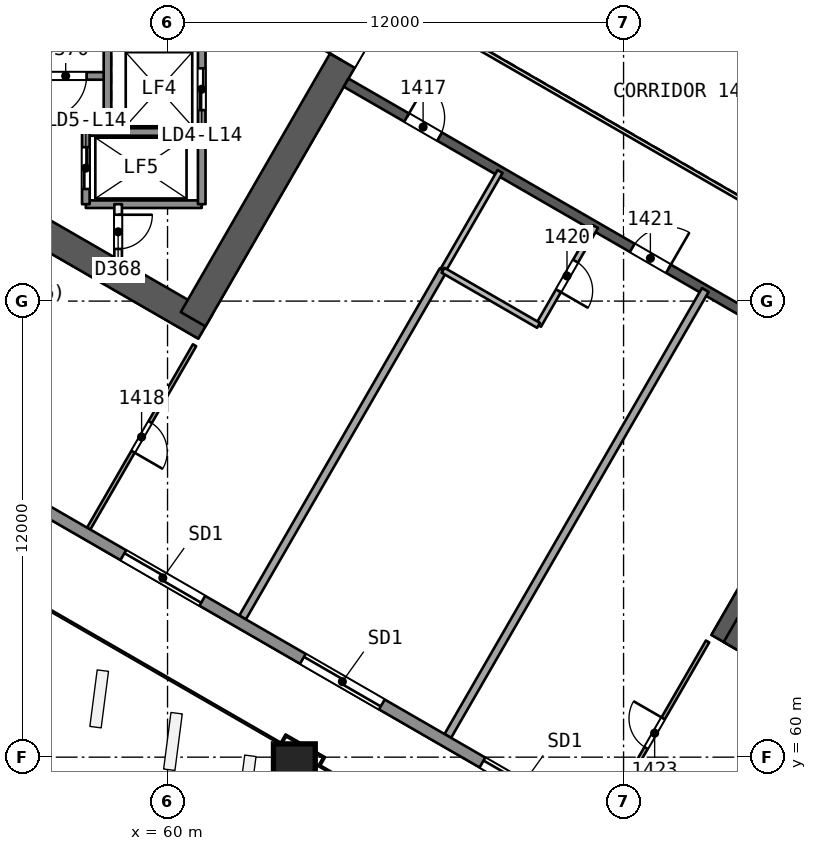
"""IFC4 building model, lengths in metres.
Left out: names, types, materials, properties, quantities, classifications, styles, units other than length and angle.
Written with IfcOpenShell. Run it as: python <this file> out.ifc"""

import sys

from ifc_helpers import new_model, si_unit, direction, frame, frame_2d, origin, origin_2d, place, context, subcontext, project, spatial, rectangle, extrude, element, fill, save


model = new_model("IFC4")
c1 = context("Model", 3, precision=1e-05, world=origin(), true_north=direction((0.0, 1.0)))
c2 = subcontext(c1, "Body", "Model", "MODEL_VIEW")
j1 = project(units=[si_unit("LENGTHUNIT", "METRE"), si_unit("PLANEANGLEUNIT", "RADIAN")], contexts=[c1])
p1 = place(None, origin())
s1 = spatial("IfcSite", under=j1, at=p1, CompositionType="ELEMENT")
p2 = place(p1, origin())
s2 = spatial("IfcBuilding", under=s1, at=p2, CompositionType="ELEMENT")
p3 = place(p2, frame((0.0, 0.0, 64.7)))
s3 = spatial("IfcBuildingStorey", under=s2, at=p3, CompositionType="ELEMENT", Elevation=64.7)
p4 = place(p3, frame((48.772, 78.394, 0.0), z_axis=(0.0, 0.0, 1.0), x_axis=(0.866028339916, -0.499994914436, 0.0)))
e1 = element("IfcWall", 1, at=p4, inside=s3, PredefinedType="SHEAR", context=c2, shape_type="SweptSolid", body=[
    extrude(rectangle(XDim=14.117, YDim=0.75, at=frame_2d((7.059, 0.0))), origin(), (0.0, 0.0, 1.0), 3.7),
])
p5 = place(p3, frame((60.673, 71.523, 0.0), z_axis=(0.0, 0.0, 1.0), x_axis=(0.499997052475, 0.866027105532, 0.0)))
e2 = element("IfcWall", 2, at=p5, inside=s3, PredefinedType="SHEAR", context=c2, shape_type="SweptSolid", body=[
    extrude(rectangle(XDim=10.005, YDim=0.75, at=frame_2d((5.002, 0.0))), origin(), (0.0, 0.0, 1.0), 3.7),
])
p6 = place(p5, frame((7.855, 0.0, 0.0)))
e3 = element("IfcOpeningElement", 3, at=p6, cuts=e2, PredefinedType="OPENING", context=c2, shape_type="SweptSolid", body=[
    extrude(rectangle(XDim=1.2, YDim=2.1, at=frame_2d((0.6, 1.05))), frame((0.0, 0.385, 0.0), z_axis=(0.0, -1.0, 0.0), x_axis=(1.0, 0.0, 0.0)), (0.0, 0.0, 1.0), 0.771),
])
p7 = place(p3, frame((79.717, 71.831, 0.0), z_axis=(0.0, 0.0, 1.0), x_axis=(-0.499996230114, -0.866027580318, 0.0)))
e4 = element("IfcWall", 4, at=p7, inside=s3, PredefinedType="SHEAR", context=c2, shape_type="SweptSolid", body=[
    extrude(rectangle(XDim=10.164, YDim=0.75, at=frame_2d((5.082, 0.0))), origin(), (0.0, 0.0, 1.0), 3.7),
])
p8 = place(p7, frame((0.733, 0.0, 0.0)))
e5 = element("IfcOpeningElement", 5, at=p8, cuts=e4, PredefinedType="OPENING", context=c2, shape_type="SweptSolid", body=[
    extrude(rectangle(XDim=1.2, YDim=2.1, at=frame_2d((0.6, 1.05))), frame((0.0, 0.385, 0.0), z_axis=(0.0, -1.0, 0.0), x_axis=(1.0, 0.0, 0.0)), (0.0, 0.0, 1.0), 0.771),
])
p9 = place(p3, frame((74.822, 63.354, 0.0), z_axis=(0.0, 0.0, 1.0), x_axis=(0.8660248072, -0.500001033313, 0.0)))
e6 = element("IfcWall", 6, at=p9, inside=s3, PredefinedType="SHEAR", context=c2, shape_type="SweptSolid", body=[
    extrude(rectangle(XDim=13.958, YDim=0.75, at=frame_2d((6.979, 0.0))), origin(), (0.0, 0.0, 1.0), 3.7),
])
p10 = place(p3, frame((64.7, 77.748, 0.0), z_axis=(0.0, 0.0, 1.0), x_axis=(0.866026492143, -0.499998114903, 0.0)))
e7 = element("IfcWall", 7, at=p10, inside=s3, PredefinedType="SHEAR", context=c2, shape_type="SweptSolid", body=[
    extrude(rectangle(XDim=15.588, YDim=0.25, at=frame_2d((7.794, 0.0))), origin(), (0.0, 0.0, 1.0), 3.2),
])
p11 = place(p10, frame((1.838, 0.0, 0.0)))
e8 = element("IfcOpeningElement", 8, at=p11, cuts=e7, PredefinedType="OPENING", context=c2, shape_type="SweptSolid", body=[
    extrude(rectangle(XDim=1.0, YDim=2.1, at=frame_2d((0.5, 1.05))), frame((0.0, 0.135, 0.0), z_axis=(0.0, -1.0, 0.0), x_axis=(1.0, 0.0, 0.0)), (0.0, 0.0, 1.0), 0.271),
])
p12 = place(p10, frame((8.694, 0.0, 0.0)))
e9 = element("IfcOpeningElement", 9, at=p12, cuts=e7, PredefinedType="OPENING", context=c2, shape_type="SweptSolid", body=[
    extrude(rectangle(XDim=1.1, YDim=2.1, at=frame_2d((0.55, 1.05))), frame((0.0, 0.135, 0.0), z_axis=(0.0, -1.0, 0.0), x_axis=(1.0, 0.0, 0.0)), (0.0, 0.0, 1.0), 0.271),
])
p13 = place(p10, frame((12.75, 0.0, 0.0)))
e10 = element("IfcOpeningElement", 10, at=p13, cuts=e7, PredefinedType="OPENING", context=c2, shape_type="SweptSolid", body=[
    extrude(rectangle(XDim=1.0, YDim=2.1, at=frame_2d((0.5, 1.05))), frame((0.0, 0.135, 0.0), z_axis=(0.0, -1.0, 0.0), x_axis=(1.0, 0.0, 0.0)), (0.0, 0.0, 1.0), 0.271),
])
p14 = place(p3, frame((63.325, 59.779, 0.0), z_axis=(0.010093620709, 0.017482414954, 0.999796221231), x_axis=(-0.866022643586, 0.500004780773, 1.3036e-08)))
e11 = element("IfcColumn", 11, at=p14, inside=s3, PredefinedType="COLUMN", context=c2, shape_type="SweptSolid", body=[
    extrude(rectangle(XDim=1.1, YDim=1.1, at=origin_2d()), origin(), (0.0, 0.0, 1.0), 3.701),
])
p15 = place(p3, frame((60.71, 70.838, 0.0), z_axis=(0.0, 0.0, 1.0), x_axis=(-0.499994302092, -0.866028693448, 0.0)))
e12 = element("IfcWall", 12, at=p15, inside=s3, PredefinedType="PARTITIONING", context=c2, shape_type="SweptSolid", body=[
    extrude(rectangle(XDim=5.571, YDim=0.1, at=frame_2d((2.786, 0.0))), origin(), (0.0, 0.0, 1.0), 3.2),
])
p16 = place(p15, frame((2.336, 0.0, 0.0)))
e13 = element("IfcOpeningElement", 13, at=p16, cuts=e12, PredefinedType="OPENING", context=c2, shape_type="SweptSolid", body=[
    extrude(rectangle(XDim=0.9, YDim=2.1, at=frame_2d((0.45, 1.05))), frame((0.0, 0.061, 0.0), z_axis=(0.0, -1.0, 0.0), x_axis=(1.0, 0.0, 0.0)), (0.0, 0.0, 1.0), 0.121),
])
p17 = place(p3, frame((61.975, 63.675, 0.0), z_axis=(0.0, 0.0, 1.0), x_axis=(0.499994206371, 0.866028748712, 0.0)))
e14 = element("IfcWall", 14, at=p17, inside=s3, PredefinedType="PARTITIONING", context=c2, shape_type="SweptSolid", body=[
    extrude(rectangle(XDim=10.551, YDim=0.2, at=frame_2d((5.275, 0.0))), origin(), (0.0, 0.0, 1.0), 3.2),
])
p18 = place(p3, frame((67.25, 72.812, 0.0), z_axis=(0.0, 0.0, 1.0), x_axis=(0.499990139034, 0.866031096941, 0.0)))
e15 = element("IfcWall", 15, at=p18, inside=s3, PredefinedType="PARTITIONING", context=c2, shape_type="SweptSolid", body=[
    extrude(rectangle(XDim=3.0, YDim=0.15, at=frame_2d((1.5, 0.0))), origin(), (0.0, 0.0, 1.0), 3.2),
])
p19 = place(p3, frame((71.261, 73.96, 0.0), z_axis=(0.0, 0.0, 1.0), x_axis=(-0.50002537861, -0.866010750942, 0.0)))
e16 = element("IfcWall", 16, at=p19, inside=s3, PredefinedType="PARTITIONING", context=c2, shape_type="SweptSolid", body=[
    extrude(rectangle(XDim=3.0, YDim=0.15, at=frame_2d((1.5, 0.0))), origin(), (0.0, 0.0, 1.0), 3.2),
])
p20 = place(p19, frame((1.05, 0.0, 0.0)))
e17 = element("IfcOpeningElement", 17, at=p20, cuts=e16, PredefinedType="OPENING", context=c2, shape_type="SweptSolid", body=[
    extrude(rectangle(XDim=0.9, YDim=2.1, at=frame_2d((0.45, 1.05))), frame((0.0, 0.085, 0.0), z_axis=(0.0, -1.0, 0.0), x_axis=(1.0, 0.0, 0.0)), (0.0, 0.0, 1.0), 0.171),
])
p21 = place(p3, frame((69.761, 71.362, 0.0), z_axis=(0.0, 0.0, 1.0), x_axis=(-0.866032775405, 0.499987231761, 0.0)))
e18 = element("IfcWall", 18, at=p21, inside=s3, PredefinedType="PARTITIONING", context=c2, shape_type="SweptSolid", body=[
    extrude(rectangle(XDim=2.9, YDim=0.15, at=frame_2d((1.45, 0.0))), origin(), (0.0, 0.0, 1.0), 3.2),
])
p22 = place(p3, frame((67.375, 60.557, 0.0), z_axis=(0.0, 0.0, 1.0), x_axis=(0.499993305868, 0.866029268609, 0.0)))
e19 = element("IfcWall", 19, at=p22, inside=s3, PredefinedType="PARTITIONING", context=c2, shape_type="SweptSolid", body=[
    extrude(rectangle(XDim=13.551, YDim=0.2, at=frame_2d((6.775, 0.0))), origin(), (0.0, 0.0, 1.0), 3.2),
])
p23 = place(p3, frame((71.425, 58.219, 0.0), z_axis=(0.0, 0.0, 1.0), x_axis=(0.499975327912, 0.866039647752, 0.0)))
e20 = element("IfcWall", 20, at=p23, inside=s3, PredefinedType="PARTITIONING", context=c2, shape_type="SweptSolid", body=[
    extrude(rectangle(XDim=5.572, YDim=0.1, at=frame_2d((2.786, 0.0))), origin(), (0.0, 0.0, 1.0), 3.2),
])
p24 = place(p23, frame((2.336, 0.0, 0.0)))
e21 = element("IfcOpeningElement", 21, at=p24, cuts=e20, PredefinedType="OPENING", context=c2, shape_type="SweptSolid", body=[
    extrude(rectangle(XDim=0.9, YDim=2.1, at=frame_2d((0.45, 1.05))), frame((0.0, 0.061, 0.0), z_axis=(0.0, -1.0, 0.0), x_axis=(1.0, 0.0, 0.0)), (0.0, 0.0, 1.0), 0.121),
])
p25 = place(p3, frame((90.499, 47.034, 0.0), z_axis=(0.0, 0.0, 1.0), x_axis=(-0.866026049211, 0.499998882086, 0.0)))
e22 = element("IfcWall", 22, at=p25, inside=s3, PredefinedType="SOLIDWALL", context=c2, shape_type="SweptSolid", body=[
    extrude(rectangle(XDim=59.811, YDim=0.3, at=frame_2d((29.905, 0.0))), origin(), (0.0, 0.0, 1.0), 3.2),
])
p26 = place(p25, frame((28.705, 0.0, 0.0)))
e23 = element("IfcOpeningElement", 23, at=p26, cuts=e22, PredefinedType="OPENING", context=c2, shape_type="SweptSolid", body=[
    extrude(rectangle(XDim=2.4, YDim=2.4, at=frame_2d((1.2, 1.2))), frame((0.0, 0.161, 0.0), z_axis=(0.0, -1.0, 0.0), x_axis=(1.0, 0.0, 0.0)), (0.0, 0.0, 1.0), 0.321),
])
p27 = place(p25, frame((34.161, 0.0, 0.0)))
e24 = element("IfcOpeningElement", 24, at=p27, cuts=e22, PredefinedType="OPENING", context=c2, shape_type="SweptSolid", body=[
    extrude(rectangle(XDim=2.4, YDim=2.4, at=frame_2d((1.2, 1.2))), frame((0.0, 0.161, 0.0), z_axis=(0.0, -1.0, 0.0), x_axis=(1.0, 0.0, 0.0)), (0.0, 0.0, 1.0), 0.321),
])
p28 = place(p25, frame((46.394, 0.0, 0.0)))
e25 = element("IfcOpeningElement", 25, at=p28, cuts=e22, PredefinedType="OPENING", context=c2, shape_type="SweptSolid", body=[
    extrude(rectangle(XDim=2.4, YDim=2.4, at=frame_2d((1.2, 1.2))), frame((0.0, 0.161, 0.0), z_axis=(0.0, -1.0, 0.0), x_axis=(1.0, 0.0, 0.0)), (0.0, 0.0, 1.0), 0.321),
])
p29 = place(p25, frame((23.249, 0.0, 0.0)))
e26 = element("IfcOpeningElement", 26, at=p29, cuts=e22, PredefinedType="OPENING", context=c2, shape_type="SweptSolid", body=[
    extrude(rectangle(XDim=2.4, YDim=2.4, at=frame_2d((1.2, 1.2))), frame((0.0, 0.161, 0.0), z_axis=(0.0, -1.0, 0.0), x_axis=(1.0, 0.0, 0.0)), (0.0, 0.0, 1.0), 0.321),
])
p30 = place(p25, frame((11.002, 0.0, 0.0)))
e27 = element("IfcOpeningElement", 27, at=p30, cuts=e22, PredefinedType="OPENING", context=c2, shape_type="SweptSolid", body=[
    extrude(rectangle(XDim=2.4, YDim=2.4, at=frame_2d((1.2, 1.2))), frame((0.0, 0.161, 0.0), z_axis=(0.0, -1.0, 0.0), x_axis=(1.0, 0.0, 0.0)), (0.0, 0.0, 1.0), 0.321),
])
p31 = place(p3, frame((58.42, 77.925, 0.0), z_axis=(0.0, 0.0, 1.0), x_axis=(-1.0, 0.0, 0.0)))
e28 = element("IfcWall", 28, at=p31, inside=s3, PredefinedType="SOLIDWALL", context=c2, shape_type="SweptSolid", body=[
    extrude(rectangle(XDim=7.7, YDim=0.2, at=frame_2d((3.85, 0.0))), origin(), (0.0, 0.0, 1.0), 3.2),
])
p32 = place(p31, frame((0.55, 0.0, 0.0)))
e29 = element("IfcOpeningElement", 29, at=p32, cuts=e28, PredefinedType="OPENING", context=c2, shape_type="SweptSolid", body=[
    extrude(rectangle(XDim=1.1, YDim=2.1, at=frame_2d((0.55, 1.05))), frame((0.0, 0.11, 0.0), z_axis=(0.0, -1.0, 0.0), x_axis=(1.0, 0.0, 0.0)), (0.0, 0.0, 1.0), 0.221),
])
for number, where, z_axis, x_axis in (
    (30, (60.9, 76.45, 0.0), (0.0, 0.0, 1.0), (-1.0, 0.0, 0.0)),
    (31, (60.9, 74.55, 0.0), (0.0, 0.0, 1.0), (-1.0, 0.0, 0.0)),
):
    element("IfcWall", number, at=place(p3, frame(where, z_axis=z_axis, x_axis=x_axis)), inside=s3, PredefinedType="SOLIDWALL", context=c2, shape_type="SweptSolid", body=[
        extrude(rectangle(XDim=3.05, YDim=0.2, at=frame_2d((1.525, 0.0))), origin(), (0.0, 0.0, 1.0), 3.2),
    ])
p33 = place(p3, frame((60.9, 85.45, 0.0), z_axis=(0.0, 0.0, 1.0), x_axis=(0.0, -1.0, 0.0)))
e32 = element("IfcWall", 32, at=p33, inside=s3, PredefinedType="SOLIDWALL", context=c2, shape_type="SweptSolid", body=[
    extrude(rectangle(XDim=10.9, YDim=0.2, at=frame_2d((5.45, 0.0))), origin(), (0.0, 0.0, 1.0), 3.2),
])
p34 = place(p33, frame((0.575, 0.0, 0.0)))
e33 = element("IfcOpeningElement", 33, at=p34, cuts=e32, PredefinedType="OPENING", context=c2, shape_type="SweptSolid", body=[
    extrude(rectangle(XDim=1.1, YDim=2.1, at=frame_2d((0.55, 1.05))), frame((0.0, 0.11, 0.0), z_axis=(0.0, -1.0, 0.0), x_axis=(1.0, 0.0, 0.0)), (0.0, 0.0, 1.0), 0.221),
])
p35 = place(p33, frame((2.825, 0.0, 0.0)))
e34 = element("IfcOpeningElement", 34, at=p35, cuts=e32, PredefinedType="OPENING", context=c2, shape_type="SweptSolid", body=[
    extrude(rectangle(XDim=1.1, YDim=2.1, at=frame_2d((0.55, 1.05))), frame((0.0, 0.11, 0.0), z_axis=(0.0, -1.0, 0.0), x_axis=(1.0, 0.0, 0.0)), (0.0, 0.0, 1.0), 0.221),
])
p36 = place(p33, frame((5.075, 0.0, 0.0)))
e35 = element("IfcOpeningElement", 35, at=p36, cuts=e32, PredefinedType="OPENING", context=c2, shape_type="SweptSolid", body=[
    extrude(rectangle(XDim=1.1, YDim=2.1, at=frame_2d((0.55, 1.05))), frame((0.0, 0.11, 0.0), z_axis=(0.0, -1.0, 0.0), x_axis=(1.0, 0.0, 0.0)), (0.0, 0.0, 1.0), 0.221),
])
p37 = place(p33, frame((7.325, 0.0, 0.0)))
e36 = element("IfcOpeningElement", 36, at=p37, cuts=e32, PredefinedType="OPENING", context=c2, shape_type="SweptSolid", body=[
    extrude(rectangle(XDim=1.1, YDim=2.1, at=frame_2d((0.55, 1.05))), frame((0.0, 0.11, 0.0), z_axis=(0.0, -1.0, 0.0), x_axis=(1.0, 0.0, 0.0)), (0.0, 0.0, 1.0), 0.221),
])
p38 = place(p3, frame((58.7, 74.55, 0.0), z_axis=(0.0, 0.0, 1.0), x_axis=(0.0, -1.0, 0.0)))
e37 = element("IfcWall", 37, at=p38, inside=s3, PredefinedType="PARTITIONING", context=c2, shape_type="SweptSolid", body=[
    extrude(rectangle(XDim=1.455, YDim=0.2, at=frame_2d((0.728, 0.0))), origin(), (0.0, 0.0, 1.0), 3.2),
])
p39 = place(p38, frame((0.278, 0.0, 0.0)))
e38 = element("IfcOpeningElement", 38, at=p39, cuts=e37, PredefinedType="OPENING", context=c2, shape_type="SweptSolid", body=[
    extrude(rectangle(XDim=0.9, YDim=2.1, at=frame_2d((0.45, 1.05))), frame((0.0, 0.11, 0.0), z_axis=(0.0, -1.0, 0.0), x_axis=(1.0, 0.0, 0.0)), (0.0, 0.0, 1.0), 0.221),
])
p40 = place(p3, frame((58.42, 85.45, 0.0), z_axis=(0.0, 0.0, 1.0), x_axis=(0.0, -1.0, 0.0)))
e39 = element("IfcWall", 39, at=p40, inside=s3, PredefinedType="SOLIDWALL", context=c2, shape_type="SweptSolid", body=[
    extrude(rectangle(XDim=9.0, YDim=0.2, at=frame_2d((4.5, 0.0))), origin(), (0.0, 0.0, 1.0), 3.2),
])
p41 = place(p3, frame((57.85, 76.45, 0.0), z_axis=(0.0, 0.0, 1.0), x_axis=(0.0, -1.0, 0.0)))
e40 = element("IfcWall", 40, at=p41, inside=s3, PredefinedType="SOLIDWALL", context=c2, shape_type="SweptSolid", body=[
    extrude(rectangle(XDim=1.9, YDim=0.2, at=frame_2d((0.95, 0.0))), origin(), (0.0, 0.0, 1.0), 3.2),
])
p42 = place(p41, frame((0.4, 0.0, 0.0)))
e41 = element("IfcOpeningElement", 41, at=p42, cuts=e40, PredefinedType="OPENING", context=c2, shape_type="SweptSolid", body=[
    extrude(rectangle(XDim=1.1, YDim=2.1, at=frame_2d((0.55, 1.05))), frame((0.0, 0.11, 0.0), z_axis=(0.0, -1.0, 0.0), x_axis=(1.0, 0.0, 0.0)), (0.0, 0.0, 1.0), 0.221),
])
p43 = place(p3, frame((67.702, 78.948, 0.0), z_axis=(0.0, 0.0, 1.0), x_axis=(0.866026658274, -0.499997827154, 0.0)))
e42 = element("IfcWall", 42, at=p43, inside=s3, PredefinedType="PARTITIONING", context=c2, shape_type="SweptSolid", body=[
    extrude(rectangle(XDim=11.588, YDim=0.1, at=frame_2d((5.794, 0.0))), origin(), (0.0, 0.0, 1.0), 3.2),
])
p44 = place(p11, origin())
e43 = element("IfcDoor", 43, at=p44, inside=s3, OperationType="SINGLE_SWING_LEFT", PredefinedType="NOTDEFINED", context=c2, shape_type="SweptSolid", body=[
    extrude(rectangle(XDim=1.0, YDim=2.1, at=frame_2d((0.5, 1.05))), frame((0.0, 0.025, 0.0), z_axis=(0.0, -1.0, 0.0), x_axis=(1.0, 0.0, 0.0)), (0.0, 0.0, 1.0), 0.05),
])
fill(e8, e43)
p45 = place(p16, origin())
e44 = element("IfcDoor", 44, at=p45, inside=s3, OperationType="SINGLE_SWING_RIGHT", PredefinedType="NOTDEFINED", context=c2, shape_type="SweptSolid", body=[
    extrude(rectangle(XDim=0.9, YDim=2.1, at=frame_2d((0.45, 1.05))), frame((0.0, 0.025, 0.0), z_axis=(0.0, -1.0, 0.0), x_axis=(1.0, 0.0, 0.0)), (0.0, 0.0, 1.0), 0.05),
])
fill(e13, e44)
p46 = place(p20, origin())
e45 = element("IfcDoor", 45, at=p46, inside=s3, OperationType="SINGLE_SWING_RIGHT", PredefinedType="NOTDEFINED", context=c2, shape_type="SweptSolid", body=[
    extrude(rectangle(XDim=0.9, YDim=2.1, at=frame_2d((0.45, 1.05))), frame((0.0, 0.025, 0.0), z_axis=(0.0, -1.0, 0.0), x_axis=(1.0, 0.0, 0.0)), (0.0, 0.0, 1.0), 0.05),
])
fill(e17, e45)
p47 = place(p12, origin())
e46 = element("IfcDoor", 46, at=p47, inside=s3, OperationType="SINGLE_SWING_RIGHT", PredefinedType="NOTDEFINED", context=c2, shape_type="SweptSolid", body=[
    extrude(rectangle(XDim=1.1, YDim=2.1, at=frame_2d((0.55, 1.05))), frame((0.0, 0.025, 0.0), z_axis=(0.0, -1.0, 0.0), x_axis=(1.0, 0.0, 0.0)), (0.0, 0.0, 1.0), 0.05),
])
fill(e9, e46)
p48 = place(p24, origin())
e47 = element("IfcDoor", 47, at=p48, inside=s3, OperationType="SINGLE_SWING_RIGHT", PredefinedType="NOTDEFINED", context=c2, shape_type="SweptSolid", body=[
    extrude(rectangle(XDim=0.9, YDim=2.1, at=frame_2d((0.45, 1.05))), frame((0.0, 0.025, 0.0), z_axis=(0.0, -1.0, 0.0), x_axis=(1.0, 0.0, 0.0)), (0.0, 0.0, 1.0), 0.05),
])
fill(e21, e47)
p49 = place(p26, origin())
e48 = element("IfcDoor", 48, at=p49, inside=s3, OperationType="SLIDING_TO_LEFT", PredefinedType="NOTDEFINED", context=c2, shape_type="SweptSolid", body=[
    extrude(rectangle(XDim=2.4, YDim=2.4, at=frame_2d((1.2, 1.2))), frame((0.0, 0.025, 0.0), z_axis=(0.0, -1.0, 0.0), x_axis=(1.0, 0.0, 0.0)), (0.0, 0.0, 1.0), 0.05),
])
fill(e23, e48)
p50 = place(p27, origin())
e49 = element("IfcDoor", 49, at=p50, inside=s3, OperationType="SLIDING_TO_RIGHT", PredefinedType="NOTDEFINED", context=c2, shape_type="SweptSolid", body=[
    extrude(rectangle(XDim=2.4, YDim=2.4, at=frame_2d((1.2, 1.2))), frame((0.0, 0.025, 0.0), z_axis=(0.0, -1.0, 0.0), x_axis=(1.0, 0.0, 0.0)), (0.0, 0.0, 1.0), 0.05),
])
fill(e24, e49)
p51 = place(p29, origin())
e50 = element("IfcDoor", 50, at=p51, inside=s3, OperationType="SLIDING_TO_RIGHT", PredefinedType="NOTDEFINED", context=c2, shape_type="SweptSolid", body=[
    extrude(rectangle(XDim=2.4, YDim=2.4, at=frame_2d((1.2, 1.2))), frame((0.0, 0.025, 0.0), z_axis=(0.0, -1.0, 0.0), x_axis=(1.0, 0.0, 0.0)), (0.0, 0.0, 1.0), 0.05),
])
fill(e26, e50)
p52 = place(p6, origin())
e51 = element("IfcDoor", 51, at=p52, inside=s3, OperationType="SINGLE_SWING_LEFT", PredefinedType="NOTDEFINED", context=c2, shape_type="SweptSolid", body=[
    extrude(rectangle(XDim=1.2, YDim=2.1, at=frame_2d((0.6, 1.05))), frame((0.0, 0.025, 0.0), z_axis=(0.0, -1.0, 0.0), x_axis=(1.0, 0.0, 0.0)), (0.0, 0.0, 1.0), 0.05),
])
fill(e3, e51)
p53 = place(p37, origin())
e52 = element("IfcDoor", 52, at=p53, inside=s3, OperationType="SLIDING_TO_LEFT", PredefinedType="NOTDEFINED", context=c2, shape_type="SweptSolid", body=[
    extrude(rectangle(XDim=1.1, YDim=2.1, at=frame_2d((0.55, 1.05))), frame((0.0, 0.025, 0.0), z_axis=(0.0, -1.0, 0.0), x_axis=(1.0, 0.0, 0.0)), (0.0, 0.0, 1.0), 0.05),
])
fill(e36, e52)
p54 = place(p42, origin())
e53 = element("IfcDoor", 53, at=p54, inside=s3, OperationType="SLIDING_TO_RIGHT", PredefinedType="NOTDEFINED", context=c2, shape_type="SweptSolid", body=[
    extrude(rectangle(XDim=1.1, YDim=2.1, at=frame_2d((0.55, 1.05))), frame((0.0, 0.025, 0.0), z_axis=(0.0, -1.0, 0.0), x_axis=(1.0, 0.0, 0.0)), (0.0, 0.0, 1.0), 0.05),
])
fill(e41, e53)
p55 = place(p39, origin())
e54 = element("IfcDoor", 54, at=p55, inside=s3, OperationType="SINGLE_SWING_LEFT", PredefinedType="NOTDEFINED", context=c2, shape_type="SweptSolid", body=[
    extrude(rectangle(XDim=0.9, YDim=2.1, at=frame_2d((0.45, 1.05))), frame((0.0, 0.025, 0.0), z_axis=(0.0, -1.0, 0.0), x_axis=(1.0, 0.0, 0.0)), (0.0, 0.0, 1.0), 0.05),
])
fill(e38, e54)
p56 = place(p32, origin())
e55 = element("IfcDoor", 55, at=p56, inside=s3, OperationType="SINGLE_SWING_RIGHT", PredefinedType="NOTDEFINED", context=c2, shape_type="SweptSolid", body=[
    extrude(rectangle(XDim=1.1, YDim=2.1, at=frame_2d((0.55, 1.05))), frame((0.0, 0.025, 0.0), z_axis=(0.0, -1.0, 0.0), x_axis=(1.0, 0.0, 0.0)), (0.0, 0.0, 1.0), 0.05),
])
fill(e29, e55)
save(model, sys.argv[1])
